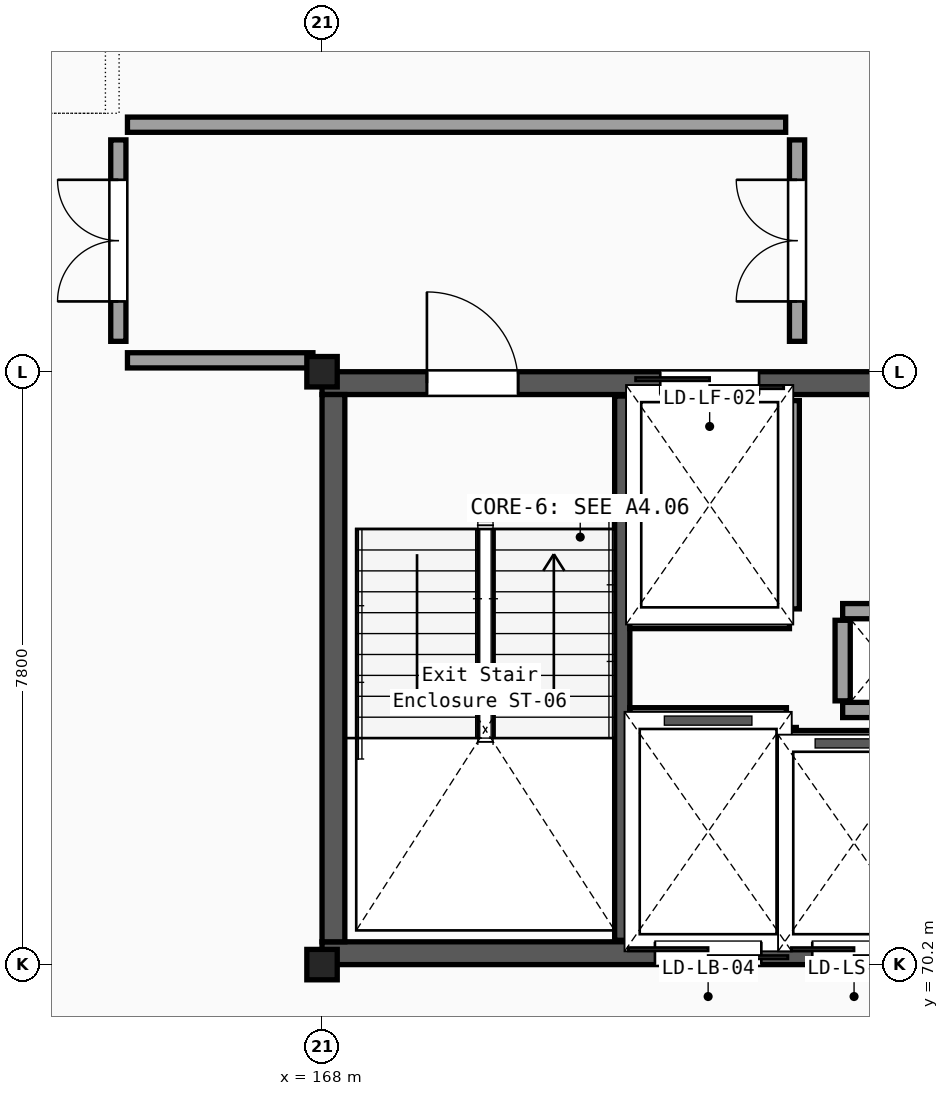
"""IFC4 building model, lengths in metres.
Left out: names, types, materials, properties, quantities, classifications, styles, units other than length and angle.
Written with IfcOpenShell. Run it as: python <this file> out.ifc"""

import sys

from ifc_helpers import new_model, si_unit, direction, frame, frame_2d, origin, origin_2d, place, context, subcontext, project, spatial, rectangle, i_section, extrude, element, fill, save


model = new_model("IFC4")
c1 = context("Model", 3, precision=1e-05, world=origin(), true_north=direction((0.0, 1.0)))
c2 = subcontext(c1, "Body", "Model", "MODEL_VIEW")
j1 = project(units=[si_unit("LENGTHUNIT", "METRE"), si_unit("PLANEANGLEUNIT", "RADIAN")], contexts=[c1])
p1 = place(None, origin())
s1 = spatial("IfcSite", under=j1, at=p1, CompositionType="ELEMENT")
p2 = place(p1, origin())
s2 = spatial("IfcBuilding", under=s1, at=p2, CompositionType="ELEMENT")
p3 = place(p2, frame((0.0, 0.0, 31.05)))
s3 = spatial("IfcBuildingStorey", under=s2, at=p3, CompositionType="ELEMENT", Elevation=31.05)
for number, where, z_axis, x_axis in (
    (1, (168.0, 70.2, 0.0), (0.0, 0.0, 1.0), (1.0, 0.0, 0.0)),
    (2, (168.0, 78.0, 0.0), (0.0, 0.0, 1.0), (1.0, 0.0, 0.0)),
):
    element("IfcColumn", number, at=place(p3, frame(where, z_axis=z_axis, x_axis=x_axis)), inside=s3, PredefinedType="COLUMN", context=c2, shape_type="SweptSolid", body=[
        extrude(i_section(OverallWidth=0.3, OverallDepth=0.4, WebThickness=0.013, FlangeThickness=0.024, FilletRadius=0.027, at=origin_2d()), origin(), (0.0, 0.0, 1.0), 4.05),
    ])
p4 = place(p3, frame((168.0, 70.35, 0.0), z_axis=(0.0, 0.0, 1.0), x_axis=(1.0, 0.0, 0.0)))
e3 = element("IfcWall", 3, at=p4, inside=s3, PredefinedType="SHEAR", context=c2, shape_type="SweptSolid", body=[
    extrude(rectangle(XDim=8.4, YDim=0.3, at=frame_2d((4.2, 0.0))), origin(), (0.0, 0.0, 1.0), 3.81),
])
p5 = place(p4, frame((4.38, 0.0, 0.0)))
e4 = element("IfcOpeningElement", 4, at=p5, cuts=e3, PredefinedType="OPENING", context=c2, shape_type="SweptSolid", body=[
    extrude(rectangle(XDim=1.4, YDim=2.2, at=frame_2d((0.7, 1.1))), frame((0.0, 0.16, 0.0), z_axis=(0.0, -1.0, 0.0), x_axis=(1.0, 0.0, 0.0)), (0.0, 0.0, 1.0), 0.32),
])
p6 = place(p4, frame((6.45, 0.0, 0.0)))
e5 = element("IfcOpeningElement", 5, at=p6, cuts=e3, PredefinedType="OPENING", context=c2, shape_type="SweptSolid", body=[
    extrude(rectangle(XDim=1.1, YDim=2.15, at=frame_2d((0.55, 1.075))), frame((0.0, 0.16, 0.0), z_axis=(0.0, -1.0, 0.0), x_axis=(1.0, 0.0, 0.0)), (0.0, 0.0, 1.0), 0.32),
])
p7 = place(p3, frame((168.0, 77.85, 0.0), z_axis=(0.0, 0.0, 1.0), x_axis=(1.0, 0.0, 0.0)))
e6 = element("IfcWall", 6, at=p7, inside=s3, PredefinedType="SHEAR", context=c2, shape_type="SweptSolid", body=[
    extrude(rectangle(XDim=8.4, YDim=0.3, at=frame_2d((4.2, 0.0))), origin(), (0.0, 0.0, 1.0), 3.81),
])
p8 = place(p7, frame((1.38, 0.0, 0.0)))
e7 = element("IfcOpeningElement", 7, at=p8, cuts=e6, PredefinedType="OPENING", context=c2, shape_type="SweptSolid", body=[
    extrude(rectangle(XDim=1.2, YDim=2.15, at=frame_2d((0.6, 1.075))), frame((0.0, 0.16, 0.0), z_axis=(0.0, -1.0, 0.0), x_axis=(1.0, 0.0, 0.0)), (0.0, 0.0, 1.0), 0.32),
])
p9 = place(p7, frame((4.45, 0.0, 0.0)))
e8 = element("IfcOpeningElement", 8, at=p9, cuts=e6, PredefinedType="OPENING", context=c2, shape_type="SweptSolid", body=[
    extrude(rectangle(XDim=1.3, YDim=2.2, at=frame_2d((0.65, 1.1))), frame((0.0, 0.16, 0.0), z_axis=(0.0, -1.0, 0.0), x_axis=(1.0, 0.0, 0.0)), (0.0, 0.0, 1.0), 0.32),
])
p10 = place(p3, frame((168.15, 70.5, 0.0), z_axis=(0.0, 0.0, 1.0), x_axis=(0.0, 1.0, 0.0)))
e9 = element("IfcWall", 9, at=p10, inside=s3, PredefinedType="SHEAR", context=c2, shape_type="SweptSolid", body=[
    extrude(rectangle(XDim=7.2, YDim=0.3, at=frame_2d((3.6, 0.0))), origin(), (0.0, 0.0, 1.0), 3.81),
])
p11 = place(p3, frame((171.95, 70.52, 0.0), z_axis=(0.0, 0.0, 1.0), x_axis=(0.0, 1.0, 0.0)))
e10 = element("IfcWall", 10, at=p11, inside=s3, PredefinedType="SHEAR", context=c2, shape_type="SweptSolid", body=[
    extrude(rectangle(XDim=7.16, YDim=0.2, at=frame_2d((3.58, 0.0))), origin(), (0.0, 0.0, 1.0), 3.81),
])
for number, where, z_axis, x_axis in (
    (11, (174.85, 73.55, 0.0), (0.0, 0.0, 1.0), (1.0, 0.0, 0.0)),
    (12, (174.85, 74.85, 0.0), (0.0, 0.0, 1.0), (1.0, 0.0, 0.0)),
):
    element("IfcWall", number, at=place(p3, frame(where, z_axis=z_axis, x_axis=x_axis)), inside=s3, PredefinedType="PARTITIONING", context=c2, shape_type="SweptSolid", body=[
        extrude(rectangle(XDim=1.1, YDim=0.2, at=frame_2d((0.55, 0.0))), origin(), (0.0, 0.0, 1.0), 3.34),
    ])
p12 = place(p3, frame((174.85, 73.67, 0.0), z_axis=(0.0, 0.0, 1.0), x_axis=(0.0, 1.0, 0.0)))
e13 = element("IfcWall", 13, at=p12, inside=s3, PredefinedType="PARTITIONING", context=c2, shape_type="SweptSolid", body=[
    extrude(rectangle(XDim=1.06, YDim=0.2, at=frame_2d((0.53, 0.0))), origin(), (0.0, 0.0, 1.0), 3.34),
])
p13 = place(p3, frame((174.18, 74.88, 0.0), z_axis=(0.0, 0.0, 1.0), x_axis=(0.0, 1.0, 0.0)))
e14 = element("IfcWall", 14, at=p13, inside=s3, PredefinedType="PARTITIONING", context=c2, shape_type="SweptSolid", body=[
    extrude(rectangle(XDim=2.74, YDim=0.2, at=frame_2d((1.37, 0.0))), origin(), (0.0, 0.0, 1.0), 3.34),
])
p14 = place(p3, frame((172.05, 74.72, 0.0), z_axis=(0.0, 0.0, 1.0), x_axis=(1.0, 0.0, 0.0)))
e15 = element("IfcWall", 15, at=p14, inside=s3, PredefinedType="PARTITIONING", context=c2, shape_type="SweptSolid", body=[
    extrude(rectangle(XDim=2.1, YDim=0.2, at=frame_2d((1.05, 0.0))), origin(), (0.0, 0.0, 1.0), 3.34),
])
p15 = place(p3, frame((174.14, 70.58, 0.0), z_axis=(0.0, 0.0, 1.0), x_axis=(0.0, 1.0, 0.0)))
e16 = element("IfcWall", 16, at=p15, inside=s3, PredefinedType="PARTITIONING", context=c2, shape_type="SweptSolid", body=[
    extrude(rectangle(XDim=2.74, YDim=0.2, at=frame_2d((1.37, 0.0))), origin(), (0.0, 0.0, 1.0), 3.34),
])
p16 = place(p3, frame((172.05, 73.48, 0.0), z_axis=(0.0, 0.0, 1.0), x_axis=(1.0, 0.0, 0.0)))
e17 = element("IfcWall", 17, at=p16, inside=s3, PredefinedType="PARTITIONING", context=c2, shape_type="SweptSolid", body=[
    extrude(rectangle(XDim=2.06, YDim=0.2, at=frame_2d((1.03, 0.0))), origin(), (0.0, 0.0, 1.0), 3.34),
])
p17 = place(p3, frame((174.07, 73.18, 0.0), z_axis=(0.0, 0.0, 1.0), x_axis=(1.0, 0.0, 0.0)))
e18 = element("IfcWall", 18, at=p17, inside=s3, PredefinedType="PARTITIONING", context=c2, shape_type="SweptSolid", body=[
    extrude(rectangle(XDim=1.86, YDim=0.2, at=frame_2d((0.93, 0.0))), origin(), (0.0, 0.0, 1.0), 3.34),
])
p18 = place(p3, frame((165.44, 78.15, 0.0), z_axis=(0.0, 0.0, 1.0), x_axis=(1.0, 0.0, 0.0)))
e19 = element("IfcWall", 19, at=p18, inside=s3, PredefinedType="PARTITIONING", context=c2, shape_type="SweptSolid", body=[
    extrude(rectangle(XDim=2.44, YDim=0.2, at=frame_2d((1.22, 0.0))), origin(), (0.0, 0.0, 1.0), 3.34),
])
p19 = place(p3, frame((165.44, 81.25, 0.0), z_axis=(0.0, 0.0, 1.0), x_axis=(1.0, 0.0, 0.0)))
e20 = element("IfcWall", 20, at=p19, inside=s3, PredefinedType="PARTITIONING", context=c2, shape_type="SweptSolid", body=[
    extrude(rectangle(XDim=8.66, YDim=0.2, at=frame_2d((4.33, 0.0))), origin(), (0.0, 0.0, 1.0), 3.34),
])
p20 = place(p3, frame((165.32, 78.4, 0.0), z_axis=(0.0, 0.0, 1.0), x_axis=(0.0, 1.0, 0.0)))
e21 = element("IfcWall", 21, at=p20, inside=s3, PredefinedType="PARTITIONING", context=c2, shape_type="SweptSolid", body=[
    extrude(rectangle(XDim=2.65, YDim=0.2, at=frame_2d((1.325, 0.0))), origin(), (0.0, 0.0, 1.0), 3.34),
])
p21 = place(p20, frame((0.525, 0.0, 0.0)))
e22 = element("IfcOpeningElement", 22, at=p21, cuts=e21, PredefinedType="OPENING", context=c2, shape_type="SweptSolid", body=[
    extrude(rectangle(XDim=1.6, YDim=2.2, at=frame_2d((0.8, 1.1))), frame((0.0, 0.11, 0.0), z_axis=(0.0, -1.0, 0.0), x_axis=(1.0, 0.0, 0.0)), (0.0, 0.0, 1.0), 0.22),
])
p22 = place(p3, frame((174.25, 78.4, 0.0), z_axis=(0.0, 0.0, 1.0), x_axis=(0.0, 1.0, 0.0)))
e23 = element("IfcWall", 23, at=p22, inside=s3, PredefinedType="PARTITIONING", context=c2, shape_type="SweptSolid", body=[
    extrude(rectangle(XDim=2.65, YDim=0.2, at=frame_2d((1.325, 0.0))), origin(), (0.0, 0.0, 1.0), 3.34),
])
p23 = place(p22, frame((0.525, 0.0, 0.0)))
e24 = element("IfcOpeningElement", 24, at=p23, cuts=e23, PredefinedType="OPENING", context=c2, shape_type="SweptSolid", body=[
    extrude(rectangle(XDim=1.6, YDim=2.2, at=frame_2d((0.8, 1.1))), frame((0.0, 0.11, 0.0), z_axis=(0.0, -1.0, 0.0), x_axis=(1.0, 0.0, 0.0)), (0.0, 0.0, 1.0), 0.22),
])
p24 = place(p8, origin())
e25 = element("IfcDoor", 25, at=p24, inside=s3, OperationType="SINGLE_SWING_LEFT", PredefinedType="DOOR", context=c2, shape_type="SweptSolid", body=[
    extrude(rectangle(XDim=1.2, YDim=2.15, at=frame_2d((0.6, 1.075))), frame((0.0, 0.025, 0.0), z_axis=(0.0, -1.0, 0.0), x_axis=(1.0, 0.0, 0.0)), (0.0, 0.0, 1.0), 0.05),
])
fill(e7, e25)
p25 = place(p9, origin())
e26 = element("IfcDoor", 26, at=p25, inside=s3, OperationType="DOUBLE_DOOR_SLIDING", PredefinedType="DOOR", context=c2, shape_type="SweptSolid", body=[
    extrude(rectangle(XDim=1.3, YDim=2.2, at=frame_2d((0.65, 1.1))), frame((0.0, 0.025, 0.0), z_axis=(0.0, -1.0, 0.0), x_axis=(1.0, 0.0, 0.0)), (0.0, 0.0, 1.0), 0.05),
])
fill(e8, e26)
p26 = place(p5, origin())
e27 = element("IfcDoor", 27, at=p26, inside=s3, OperationType="DOUBLE_DOOR_SLIDING", PredefinedType="DOOR", context=c2, shape_type="SweptSolid", body=[
    extrude(rectangle(XDim=1.4, YDim=2.2, at=frame_2d((0.7, 1.1))), frame((0.0, 0.025, 0.0), z_axis=(0.0, -1.0, 0.0), x_axis=(1.0, 0.0, 0.0)), (0.0, 0.0, 1.0), 0.05),
])
fill(e4, e27)
p27 = place(p6, origin())
e28 = element("IfcDoor", 28, at=p27, inside=s3, OperationType="DOUBLE_DOOR_SLIDING", PredefinedType="DOOR", context=c2, shape_type="SweptSolid", body=[
    extrude(rectangle(XDim=1.1, YDim=2.15, at=frame_2d((0.55, 1.075))), frame((0.0, 0.025, 0.0), z_axis=(0.0, -1.0, 0.0), x_axis=(1.0, 0.0, 0.0)), (0.0, 0.0, 1.0), 0.05),
])
fill(e5, e28)
p28 = place(p21, origin())
e29 = element("IfcDoor", 29, at=p28, inside=s3, OperationType="DOUBLE_DOOR_SINGLE_SWING", PredefinedType="DOOR", context=c2, shape_type="SweptSolid", body=[
    extrude(rectangle(XDim=1.6, YDim=2.2, at=frame_2d((0.8, 1.1))), frame((0.0, 0.025, 0.0), z_axis=(0.0, -1.0, 0.0), x_axis=(1.0, 0.0, 0.0)), (0.0, 0.0, 1.0), 0.05),
])
fill(e22, e29)
p29 = place(p23, origin())
e30 = element("IfcDoor", 30, at=p29, inside=s3, OperationType="DOUBLE_DOOR_SINGLE_SWING", PredefinedType="DOOR", context=c2, shape_type="SweptSolid", body=[
    extrude(rectangle(XDim=1.6, YDim=2.2, at=frame_2d((0.8, 1.1))), frame((0.0, 0.025, 0.0), z_axis=(0.0, -1.0, 0.0), x_axis=(1.0, 0.0, 0.0)), (0.0, 0.0, 1.0), 0.05),
])
fill(e24, e30)
save(model, sys.argv[1])
